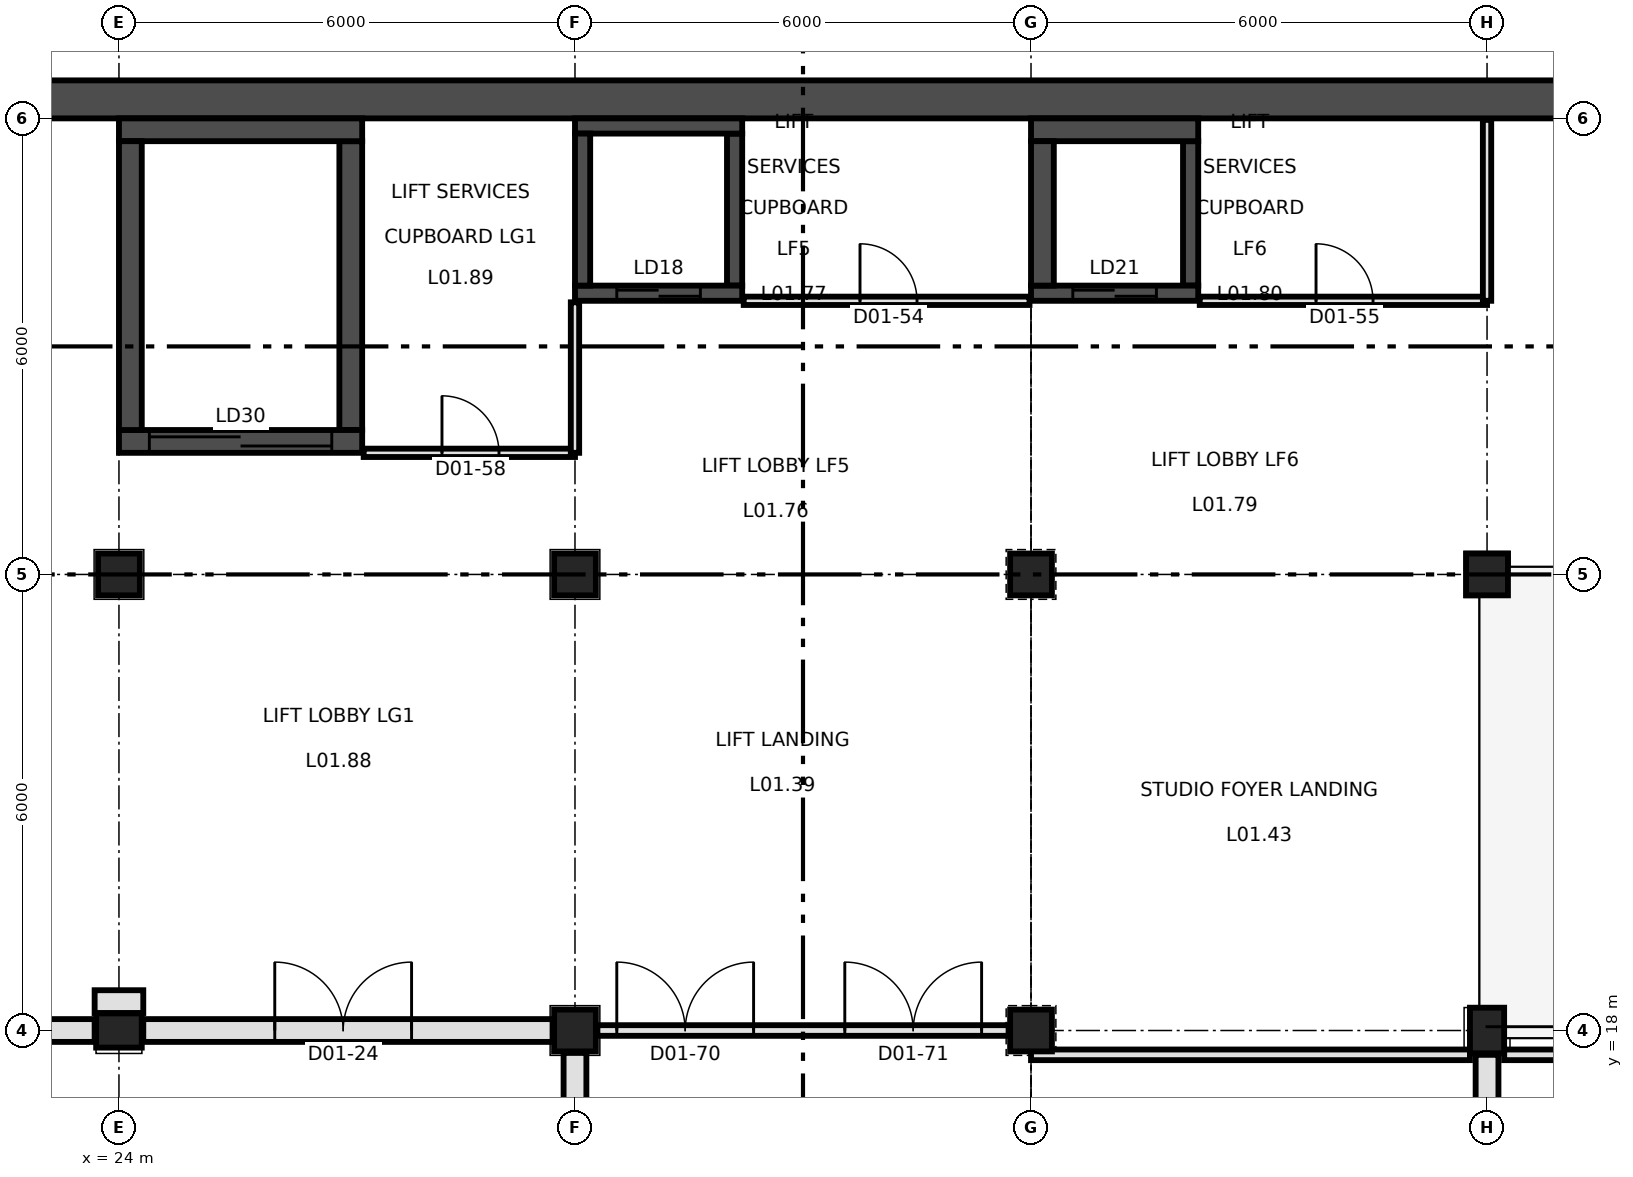
"""IFC4 building model, lengths in metres.
Left out: names, types, materials, properties, quantities, classifications, styles, units other than length and angle.
Written with IfcOpenShell. Run it as: python <this file> out.ifc"""

import sys

from ifc_helpers import new_model, si_unit, direction, frame, frame_2d, origin, origin_2d, place, context, subcontext, project, spatial, rectangle, extrude, element, fill, save


model = new_model("IFC4")
c1 = context("Model", 3, precision=1e-05, world=origin(), true_north=direction((0.0, 1.0)))
c2 = subcontext(c1, "Body", "Model", "MODEL_VIEW")
j1 = project(units=[si_unit("LENGTHUNIT", "METRE"), si_unit("PLANEANGLEUNIT", "RADIAN")], contexts=[c1])
p1 = place(None, origin())
s1 = spatial("IfcSite", under=j1, at=p1, CompositionType="ELEMENT")
p2 = place(p1, origin())
s2 = spatial("IfcBuilding", under=s1, at=p2, CompositionType="ELEMENT")
p3 = place(p2, frame((0.0, 0.0, 7.0)))
s3 = spatial("IfcBuildingStorey", under=s2, at=p3, CompositionType="ELEMENT", Elevation=7.0)
p4 = place(p3, frame((24.0, 18.0, 0.0), z_axis=(0.0, 0.0, 1.0), x_axis=(1.0, 0.0, 0.0)))
e1 = element("IfcColumn", 1, at=p4, inside=s3, PredefinedType="COLUMN", context=c2, shape_type="SweptSolid", body=[
    extrude(rectangle(XDim=0.6, YDim=0.45, at=origin_2d()), origin(), (0.0, 0.0, 1.0), 5.0),
])
for number, where, z_axis, x_axis in (
    (2, (30.0, 18.0, 0.0), (0.0, 0.0, 1.0), (1.0, 0.0, 0.0)),
    (3, (36.0, 18.0, 0.0), (0.0, 0.0, 1.0), (1.0, 0.0, 0.0)),
):
    element("IfcColumn", number, at=place(p3, frame(where, z_axis=z_axis, x_axis=x_axis)), inside=s3, PredefinedType="COLUMN", context=c2, shape_type="SweptSolid", body=[
        extrude(rectangle(XDim=0.55, YDim=0.55, at=origin_2d()), origin(), (0.0, 0.0, 1.0), 5.0),
    ])
p5 = place(p3, frame((42.0, 18.0, 0.0), z_axis=(0.0, 0.0, 1.0), x_axis=(1.0, 0.0, 0.0)))
e4 = element("IfcColumn", 4, at=p5, inside=s3, PredefinedType="COLUMN", context=c2, shape_type="SweptSolid", body=[
    extrude(rectangle(XDim=0.45, YDim=0.6, at=origin_2d()), origin(), (0.0, 0.0, 1.0), 5.0),
])
for number, where, z_axis, x_axis in (
    (5, (24.0, 24.0, 0.0), (0.0, 0.0, 1.0), (1.0, 0.0, 0.0)),
    (6, (30.0, 24.0, 0.0), (0.0, 0.0, 1.0), (1.0, 0.0, 0.0)),
    (7, (36.0, 24.0, 0.0), (0.0, 0.0, 1.0), (1.0, 0.0, 0.0)),
    (8, (42.0, 24.0, 0.0), (0.0, 0.0, 1.0), (1.0, 0.0, 0.0)),
):
    element("IfcColumn", number, at=place(p3, frame(where, z_axis=z_axis, x_axis=x_axis)), inside=s3, PredefinedType="COLUMN", context=c2, shape_type="SweptSolid", body=[
        extrude(rectangle(XDim=0.55, YDim=0.55, at=origin_2d()), origin(), (0.0, 0.0, 1.0), 5.0),
    ])
p6 = place(p3, frame((30.0, 29.9, 0.0), z_axis=(0.0, 0.0, 1.0), x_axis=(1.0, 0.0, 0.0)))
e9 = element("IfcWall", 9, at=p6, inside=s3, PredefinedType="SHEAR", context=c2, shape_type="SweptSolid", body=[
    extrude(rectangle(XDim=2.2, YDim=0.2, at=frame_2d((1.1, 0.0))), origin(), (0.0, 0.0, 1.0), 5.0),
])
p7 = place(p3, frame((30.0, 27.7, 0.0), z_axis=(0.0, 0.0, 1.0), x_axis=(1.0, 0.0, 0.0)))
e10 = element("IfcWall", 10, at=p7, inside=s3, PredefinedType="SHEAR", context=c2, shape_type="SweptSolid", body=[
    extrude(rectangle(XDim=2.2, YDim=0.2, at=frame_2d((1.1, 0.0))), origin(), (0.0, 0.0, 1.0), 5.0),
])
p8 = place(p7, frame((0.55, 0.0, 0.0)))
e11 = element("IfcOpeningElement", 11, at=p8, cuts=e10, PredefinedType="OPENING", context=c2, shape_type="SweptSolid", body=[
    extrude(rectangle(XDim=1.1, YDim=2.1, at=frame_2d((0.55, 1.05))), frame((0.0, 0.11, 0.0), z_axis=(0.0, -1.0, 0.0), x_axis=(1.0, 0.0, 0.0)), (0.0, 0.0, 1.0), 0.22),
])
for number, where, z_axis, x_axis in (
    (12, (30.1, 27.8, 0.0), (0.0, 0.0, 1.0), (0.0, 1.0, 0.0)),
    (13, (32.1, 27.8, 0.0), (0.0, 0.0, 1.0), (0.0, 1.0, 0.0)),
):
    element("IfcWall", number, at=place(p3, frame(where, z_axis=z_axis, x_axis=x_axis)), inside=s3, PredefinedType="SHEAR", context=c2, shape_type="SweptSolid", body=[
        extrude(rectangle(XDim=2.0, YDim=0.2, at=frame_2d((1.0, 0.0))), origin(), (0.0, 0.0, 1.0), 5.0),
    ])
p9 = place(p3, frame((36.0, 29.85, 0.0), z_axis=(0.0, 0.0, 1.0), x_axis=(1.0, 0.0, 0.0)))
e14 = element("IfcWall", 14, at=p9, inside=s3, PredefinedType="SHEAR", context=c2, shape_type="SweptSolid", body=[
    extrude(rectangle(XDim=2.2, YDim=0.3, at=frame_2d((1.1, 0.0))), origin(), (0.0, 0.0, 1.0), 5.0),
])
p10 = place(p3, frame((36.0, 27.7, 0.0), z_axis=(0.0, 0.0, 1.0), x_axis=(1.0, 0.0, 0.0)))
e15 = element("IfcWall", 15, at=p10, inside=s3, PredefinedType="SHEAR", context=c2, shape_type="SweptSolid", body=[
    extrude(rectangle(XDim=2.2, YDim=0.2, at=frame_2d((1.1, 0.0))), origin(), (0.0, 0.0, 1.0), 5.0),
])
p11 = place(p10, frame((0.55, 0.0, 0.0)))
e16 = element("IfcOpeningElement", 16, at=p11, cuts=e15, PredefinedType="OPENING", context=c2, shape_type="SweptSolid", body=[
    extrude(rectangle(XDim=1.1, YDim=2.1, at=frame_2d((0.55, 1.05))), frame((0.0, 0.11, 0.0), z_axis=(0.0, -1.0, 0.0), x_axis=(1.0, 0.0, 0.0)), (0.0, 0.0, 1.0), 0.22),
])
p12 = place(p3, frame((36.15, 27.8, 0.0), z_axis=(0.0, 0.0, 1.0), x_axis=(0.0, 1.0, 0.0)))
e17 = element("IfcWall", 17, at=p12, inside=s3, PredefinedType="SHEAR", context=c2, shape_type="SweptSolid", body=[
    extrude(rectangle(XDim=1.9, YDim=0.3, at=frame_2d((0.95, 0.0))), origin(), (0.0, 0.0, 1.0), 5.0),
])
p13 = place(p3, frame((38.1, 27.8, 0.0), z_axis=(0.0, 0.0, 1.0), x_axis=(0.0, 1.0, 0.0)))
e18 = element("IfcWall", 18, at=p13, inside=s3, PredefinedType="SHEAR", context=c2, shape_type="SweptSolid", body=[
    extrude(rectangle(XDim=1.9, YDim=0.2, at=frame_2d((0.95, 0.0))), origin(), (0.0, 0.0, 1.0), 5.0),
])
p14 = place(p3, frame((24.0, 29.85, 0.0), z_axis=(0.0, 0.0, 1.0), x_axis=(1.0, 0.0, 0.0)))
e19 = element("IfcWall", 19, at=p14, inside=s3, PredefinedType="SHEAR", context=c2, shape_type="SweptSolid", body=[
    extrude(rectangle(XDim=3.2, YDim=0.3, at=frame_2d((1.6, 0.0))), origin(), (0.0, 0.0, 1.0), 5.0),
])
p15 = place(p3, frame((24.0, 25.75, 0.0), z_axis=(0.0, 0.0, 1.0), x_axis=(1.0, 0.0, 0.0)))
e20 = element("IfcWall", 20, at=p15, inside=s3, PredefinedType="SHEAR", context=c2, shape_type="SweptSolid", body=[
    extrude(rectangle(XDim=3.2, YDim=0.3, at=frame_2d((1.6, 0.0))), origin(), (0.0, 0.0, 1.0), 5.0),
])
p16 = place(p15, frame((0.4, 0.0, 0.0)))
e21 = element("IfcOpeningElement", 21, at=p16, cuts=e20, PredefinedType="OPENING", context=c2, shape_type="SweptSolid", body=[
    extrude(rectangle(XDim=2.4, YDim=2.4, at=frame_2d((1.2, 1.2))), frame((0.0, 0.16, 0.0), z_axis=(0.0, -1.0, 0.0), x_axis=(1.0, 0.0, 0.0)), (0.0, 0.0, 1.0), 0.32),
])
for number, where, z_axis, x_axis in (
    (22, (24.15, 25.9, 0.0), (0.0, 0.0, 1.0), (0.0, 1.0, 0.0)),
    (23, (27.05, 25.9, 0.0), (0.0, 0.0, 1.0), (0.0, 1.0, 0.0)),
):
    element("IfcWall", number, at=place(p3, frame(where, z_axis=z_axis, x_axis=x_axis)), inside=s3, PredefinedType="SHEAR", context=c2, shape_type="SweptSolid", body=[
        extrude(rectangle(XDim=3.8, YDim=0.3, at=frame_2d((1.9, 0.0))), origin(), (0.0, 0.0, 1.0), 5.0),
    ])
p17 = place(p3, frame((18.5, 30.25, 0.0), z_axis=(0.0, 0.0, 1.0), x_axis=(1.0, 0.0, 0.0)))
e24 = element("IfcWall", 24, at=p17, inside=s3, PredefinedType="SHEAR", context=c2, shape_type="SweptSolid", body=[
    extrude(rectangle(XDim=29.0, YDim=0.5, at=frame_2d((14.5, 0.0))), origin(), (0.0, 0.0, 1.0), 5.0),
])
p18 = place(p17, frame((1.25, 0.0, 0.0)))
e25 = element("IfcOpeningElement", 25, at=p18, cuts=e24, PredefinedType="OPENING", context=c2, shape_type="SweptSolid", body=[
    extrude(rectangle(XDim=2.4, YDim=3.6, at=frame_2d((1.2, 1.8))), frame((0.0, 0.26, 0.0), z_axis=(0.0, -1.0, 0.0), x_axis=(1.0, 0.0, 0.0)), (0.0, 0.0, 1.0), 0.52),
])
p19 = place(p17, frame((25.75, 0.0, 0.0)))
e26 = element("IfcOpeningElement", 26, at=p19, cuts=e24, PredefinedType="OPENING", context=c2, shape_type="SweptSolid", body=[
    extrude(rectangle(XDim=1.5, YDim=2.1, at=frame_2d((0.75, 1.05))), frame((0.0, 0.26, 0.0), z_axis=(0.0, -1.0, 0.0), x_axis=(1.0, 0.0, 0.0)), (0.0, 0.0, 1.0), 0.52),
])
p20 = place(p3, frame((18.32, 18.0, 0.0), z_axis=(0.0, 0.0, 1.0), x_axis=(1.0, 0.0, 0.0)))
e27 = element("IfcWall", 27, at=p20, inside=s3, PredefinedType="PARTITIONING", context=c2, shape_type="SweptSolid", body=[
    extrude(rectangle(XDim=5.36, YDim=0.3, at=frame_2d((2.68, 0.0))), origin(), (0.0, 0.0, 1.0), 4.1),
])
p21 = place(p20, frame((1.73, 0.0, 0.0)))
e28 = element("IfcOpeningElement", 28, at=p21, cuts=e27, PredefinedType="OPENING", context=c2, shape_type="SweptSolid", body=[
    extrude(rectangle(XDim=1.8, YDim=2.1, at=frame_2d((0.9, 1.05))), frame((0.0, 0.16, 0.0), z_axis=(0.0, -1.0, 0.0), x_axis=(1.0, 0.0, 0.0)), (0.0, 0.0, 1.0), 0.32),
])
p22 = place(p3, frame((24.32, 18.0, 0.0), z_axis=(0.0, 0.0, 1.0), x_axis=(1.0, 0.0, 0.0)))
e29 = element("IfcWall", 29, at=p22, inside=s3, PredefinedType="PARTITIONING", context=c2, shape_type="SweptSolid", body=[
    extrude(rectangle(XDim=5.385, YDim=0.3, at=frame_2d((2.692, 0.0))), origin(), (0.0, 0.0, 1.0), 4.1),
])
p23 = place(p22, frame((1.73, 0.0, 0.0)))
e30 = element("IfcOpeningElement", 30, at=p23, cuts=e29, PredefinedType="OPENING", context=c2, shape_type="SweptSolid", body=[
    extrude(rectangle(XDim=1.8, YDim=2.1, at=frame_2d((0.9, 1.05))), frame((0.0, 0.16, 0.0), z_axis=(0.0, -1.0, 0.0), x_axis=(1.0, 0.0, 0.0)), (0.0, 0.0, 1.0), 0.32),
])
p24 = place(p3, frame((23.68, 18.38, 0.0), z_axis=(0.0, 0.0, 1.0), x_axis=(1.0, 0.0, 0.0)))
e31 = element("IfcWall", 31, at=p24, inside=s3, PredefinedType="PARTITIONING", context=c2, shape_type="SweptSolid", body=[
    extrude(rectangle(XDim=0.64, YDim=0.3, at=frame_2d((0.32, 0.0))), origin(), (0.0, 0.0, 1.0), 4.05),
])
p25 = place(p3, frame((30.0, 12.32, 0.0), z_axis=(0.0, 0.0, 1.0), x_axis=(0.0, 1.0, 0.0)))
e32 = element("IfcWall", 32, at=p25, inside=s3, PredefinedType="PARTITIONING", context=c2, shape_type="SweptSolid", body=[
    extrude(rectangle(XDim=5.385, YDim=0.3, at=frame_2d((2.692, 0.0))), origin(), (0.0, 0.0, 1.0), 4.1),
])
p26 = place(p3, frame((42.0, 12.32, 0.0), z_axis=(0.0, 0.0, 1.0), x_axis=(0.0, 1.0, 0.0)))
e33 = element("IfcWall", 33, at=p26, inside=s3, PredefinedType="PARTITIONING", context=c2, shape_type="SweptSolid", body=[
    extrude(rectangle(XDim=5.36, YDim=0.3, at=frame_2d((2.68, 0.0))), origin(), (0.0, 0.0, 1.0), 4.1),
])
p27 = place(p26, frame((1.73, 0.0, 0.0)))
e34 = element("IfcOpeningElement", 34, at=p27, cuts=e33, PredefinedType="OPENING", context=c2, shape_type="SweptSolid", body=[
    extrude(rectangle(XDim=1.8, YDim=2.1, at=frame_2d((0.9, 1.05))), frame((0.0, 0.16, 0.0), z_axis=(0.0, -1.0, 0.0), x_axis=(1.0, 0.0, 0.0)), (0.0, 0.0, 1.0), 0.32),
])
p28 = place(p3, frame((27.22, 25.6, 0.0), z_axis=(0.0, 0.0, 1.0), x_axis=(1.0, 0.0, 0.0)))
e35 = element("IfcWall", 35, at=p28, inside=s3, PredefinedType="PARTITIONING", context=c2, shape_type="SweptSolid", body=[
    extrude(rectangle(XDim=2.78, YDim=0.11, at=frame_2d((1.39, 0.0))), origin(), (0.0, 0.0, 1.0), 4.05),
])
p29 = place(p28, frame((1.03, 0.0, 0.0)))
e36 = element("IfcOpeningElement", 36, at=p29, cuts=e35, PredefinedType="OPENING", context=c2, shape_type="SweptSolid", body=[
    extrude(rectangle(XDim=0.75, YDim=2.04, at=frame_2d((0.375, 1.02))), frame((0.0, 0.065, 0.0), z_axis=(0.0, -1.0, 0.0), x_axis=(1.0, 0.0, 0.0)), (0.0, 0.0, 1.0), 0.13),
])
p30 = place(p3, frame((30.0, 25.6, 0.0), z_axis=(0.0, 0.0, 1.0), x_axis=(0.0, 1.0, 0.0)))
e37 = element("IfcWall", 37, at=p30, inside=s3, PredefinedType="PARTITIONING", context=c2, shape_type="SweptSolid", body=[
    extrude(rectangle(XDim=1.98, YDim=0.11, at=frame_2d((0.99, 0.0))), origin(), (0.0, 0.0, 1.0), 4.05),
])
p31 = place(p3, frame((32.22, 27.6, 0.0), z_axis=(0.0, 0.0, 1.0), x_axis=(1.0, 0.0, 0.0)))
e38 = element("IfcWall", 38, at=p31, inside=s3, PredefinedType="PARTITIONING", context=c2, shape_type="SweptSolid", body=[
    extrude(rectangle(XDim=3.76, YDim=0.11, at=frame_2d((1.88, 0.0))), origin(), (0.0, 0.0, 1.0), 4.15),
])
p32 = place(p31, frame((1.53, 0.0, 0.0)))
e39 = element("IfcOpeningElement", 39, at=p32, cuts=e38, PredefinedType="OPENING", context=c2, shape_type="SweptSolid", body=[
    extrude(rectangle(XDim=0.75, YDim=2.04, at=frame_2d((0.375, 1.02))), frame((0.0, 0.065, 0.0), z_axis=(0.0, -1.0, 0.0), x_axis=(1.0, 0.0, 0.0)), (0.0, 0.0, 1.0), 0.13),
])
p33 = place(p3, frame((38.22, 27.6, 0.0), z_axis=(0.0, 0.0, 1.0), x_axis=(1.0, 0.0, 0.0)))
e40 = element("IfcWall", 40, at=p33, inside=s3, PredefinedType="PARTITIONING", context=c2, shape_type="SweptSolid", body=[
    extrude(rectangle(XDim=3.78, YDim=0.11, at=frame_2d((1.89, 0.0))), origin(), (0.0, 0.0, 1.0), 4.15),
])
p34 = place(p33, frame((1.53, 0.0, 0.0)))
e41 = element("IfcOpeningElement", 41, at=p34, cuts=e40, PredefinedType="OPENING", context=c2, shape_type="SweptSolid", body=[
    extrude(rectangle(XDim=0.75, YDim=2.04, at=frame_2d((0.375, 1.02))), frame((0.0, 0.065, 0.0), z_axis=(0.0, -1.0, 0.0), x_axis=(1.0, 0.0, 0.0)), (0.0, 0.0, 1.0), 0.13),
])
p35 = place(p3, frame((42.0, 27.6, 0.0), z_axis=(0.0, 0.0, 1.0), x_axis=(0.0, 1.0, 0.0)))
e42 = element("IfcWall", 42, at=p35, inside=s3, PredefinedType="PARTITIONING", context=c2, shape_type="SweptSolid", body=[
    extrude(rectangle(XDim=2.38, YDim=0.11, at=frame_2d((1.19, 0.0))), origin(), (0.0, 0.0, 1.0), 4.15),
])
p36 = place(p3, frame((30.295, 18.0, 0.0), z_axis=(0.0, 0.0, 1.0), x_axis=(1.0, 0.0, 0.0)))
e43 = element("IfcWall", 43, at=p36, inside=s3, PredefinedType="PARTITIONING", context=c2, shape_type="SweptSolid", body=[
    extrude(rectangle(XDim=5.41, YDim=0.14, at=frame_2d((2.705, 0.0))), origin(), (0.0, 0.0, 1.0), 4.05),
])
p37 = place(p36, frame((0.255, 0.0, 0.0)))
e44 = element("IfcOpeningElement", 44, at=p37, cuts=e43, PredefinedType="OPENING", context=c2, shape_type="SweptSolid", body=[
    extrude(rectangle(XDim=1.8, YDim=2.1, at=frame_2d((0.9, 1.05))), frame((0.0, 0.08, 0.0), z_axis=(0.0, -1.0, 0.0), x_axis=(1.0, 0.0, 0.0)), (0.0, 0.0, 1.0), 0.16),
])
p38 = place(p36, frame((3.255, 0.0, 0.0)))
e45 = element("IfcOpeningElement", 45, at=p38, cuts=e43, PredefinedType="OPENING", context=c2, shape_type="SweptSolid", body=[
    extrude(rectangle(XDim=1.8, YDim=2.1, at=frame_2d((0.9, 1.05))), frame((0.0, 0.08, 0.0), z_axis=(0.0, -1.0, 0.0), x_axis=(1.0, 0.0, 0.0)), (0.0, 0.0, 1.0), 0.16),
])
p39 = place(p3, frame((36.0, 17.68, 0.0), z_axis=(0.0, 0.0, 1.0), x_axis=(1.0, 0.0, 0.0)))
e46 = element("IfcWall", 46, at=p39, inside=s3, PredefinedType="PARTITIONING", context=c2, shape_type="SweptSolid", body=[
    extrude(rectangle(XDim=5.775, YDim=0.14, at=frame_2d((2.887, 0.0))), origin(), (0.0, 0.0, 1.0), 4.1),
])
p40 = place(p3, frame((42.225, 17.68, 0.0), z_axis=(0.0, 0.0, 1.0), x_axis=(1.0, 0.0, 0.0)))
e47 = element("IfcWall", 47, at=p40, inside=s3, PredefinedType="PARTITIONING", context=c2, shape_type="SweptSolid", body=[
    extrude(rectangle(XDim=11.775, YDim=0.14, at=frame_2d((5.887, 0.0))), origin(), (0.0, 0.0, 1.0), 5.0),
])
p41 = place(p23, origin())
e48 = element("IfcDoor", 48, at=p41, inside=s3, OperationType="DOUBLE_DOOR_SINGLE_SWING", PredefinedType="DOOR", context=c2, shape_type="SweptSolid", body=[
    extrude(rectangle(XDim=1.8, YDim=2.1, at=frame_2d((0.9, 1.05))), frame((0.0, 0.025, 0.0), z_axis=(0.0, -1.0, 0.0), x_axis=(1.0, 0.0, 0.0)), (0.0, 0.0, 1.0), 0.05),
])
fill(e30, e48)
p42 = place(p32, origin())
e49 = element("IfcDoor", 49, at=p42, inside=s3, OperationType="SINGLE_SWING_LEFT", PredefinedType="DOOR", context=c2, shape_type="SweptSolid", body=[
    extrude(rectangle(XDim=0.75, YDim=2.04, at=frame_2d((0.375, 1.02))), frame((0.0, 0.025, 0.0), z_axis=(0.0, -1.0, 0.0), x_axis=(1.0, 0.0, 0.0)), (0.0, 0.0, 1.0), 0.05),
])
fill(e39, e49)
p43 = place(p34, origin())
e50 = element("IfcDoor", 50, at=p43, inside=s3, OperationType="SINGLE_SWING_LEFT", PredefinedType="DOOR", context=c2, shape_type="SweptSolid", body=[
    extrude(rectangle(XDim=0.75, YDim=2.04, at=frame_2d((0.375, 1.02))), frame((0.0, 0.025, 0.0), z_axis=(0.0, -1.0, 0.0), x_axis=(1.0, 0.0, 0.0)), (0.0, 0.0, 1.0), 0.05),
])
fill(e41, e50)
p44 = place(p29, origin())
e51 = element("IfcDoor", 51, at=p44, inside=s3, OperationType="SINGLE_SWING_LEFT", PredefinedType="DOOR", context=c2, shape_type="SweptSolid", body=[
    extrude(rectangle(XDim=0.75, YDim=2.04, at=frame_2d((0.375, 1.02))), frame((0.0, 0.025, 0.0), z_axis=(0.0, -1.0, 0.0), x_axis=(1.0, 0.0, 0.0)), (0.0, 0.0, 1.0), 0.05),
])
fill(e36, e51)
p45 = place(p37, origin())
e52 = element("IfcDoor", 52, at=p45, inside=s3, OperationType="DOUBLE_DOOR_SINGLE_SWING", PredefinedType="DOOR", context=c2, shape_type="SweptSolid", body=[
    extrude(rectangle(XDim=1.8, YDim=2.1, at=frame_2d((0.9, 1.05))), frame((0.0, 0.025, 0.0), z_axis=(0.0, -1.0, 0.0), x_axis=(1.0, 0.0, 0.0)), (0.0, 0.0, 1.0), 0.05),
])
fill(e44, e52)
p46 = place(p38, origin())
e53 = element("IfcDoor", 53, at=p46, inside=s3, OperationType="DOUBLE_DOOR_SINGLE_SWING", PredefinedType="DOOR", context=c2, shape_type="SweptSolid", body=[
    extrude(rectangle(XDim=1.8, YDim=2.1, at=frame_2d((0.9, 1.05))), frame((0.0, 0.025, 0.0), z_axis=(0.0, -1.0, 0.0), x_axis=(1.0, 0.0, 0.0)), (0.0, 0.0, 1.0), 0.05),
])
fill(e45, e53)
p47 = place(p8, origin())
e54 = element("IfcDoor", 54, at=p47, inside=s3, OperationType="DOUBLE_DOOR_SLIDING", PredefinedType="DOOR", context=c2, shape_type="SweptSolid", body=[
    extrude(rectangle(XDim=1.1, YDim=2.1, at=frame_2d((0.55, 1.05))), frame((0.0, 0.025, 0.0), z_axis=(0.0, -1.0, 0.0), x_axis=(1.0, 0.0, 0.0)), (0.0, 0.0, 1.0), 0.05),
])
fill(e11, e54)
p48 = place(p11, origin())
e55 = element("IfcDoor", 55, at=p48, inside=s3, OperationType="DOUBLE_DOOR_SLIDING", PredefinedType="DOOR", context=c2, shape_type="SweptSolid", body=[
    extrude(rectangle(XDim=1.1, YDim=2.1, at=frame_2d((0.55, 1.05))), frame((0.0, 0.025, 0.0), z_axis=(0.0, -1.0, 0.0), x_axis=(1.0, 0.0, 0.0)), (0.0, 0.0, 1.0), 0.05),
])
fill(e16, e55)
p49 = place(p16, origin())
e56 = element("IfcDoor", 56, at=p49, inside=s3, OperationType="DOUBLE_DOOR_SLIDING", PredefinedType="DOOR", context=c2, shape_type="SweptSolid", body=[
    extrude(rectangle(XDim=2.4, YDim=2.4, at=frame_2d((1.2, 1.2))), frame((0.0, 0.025, 0.0), z_axis=(0.0, -1.0, 0.0), x_axis=(1.0, 0.0, 0.0)), (0.0, 0.0, 1.0), 0.05),
])
fill(e21, e56)
save(model, sys.argv[1])
